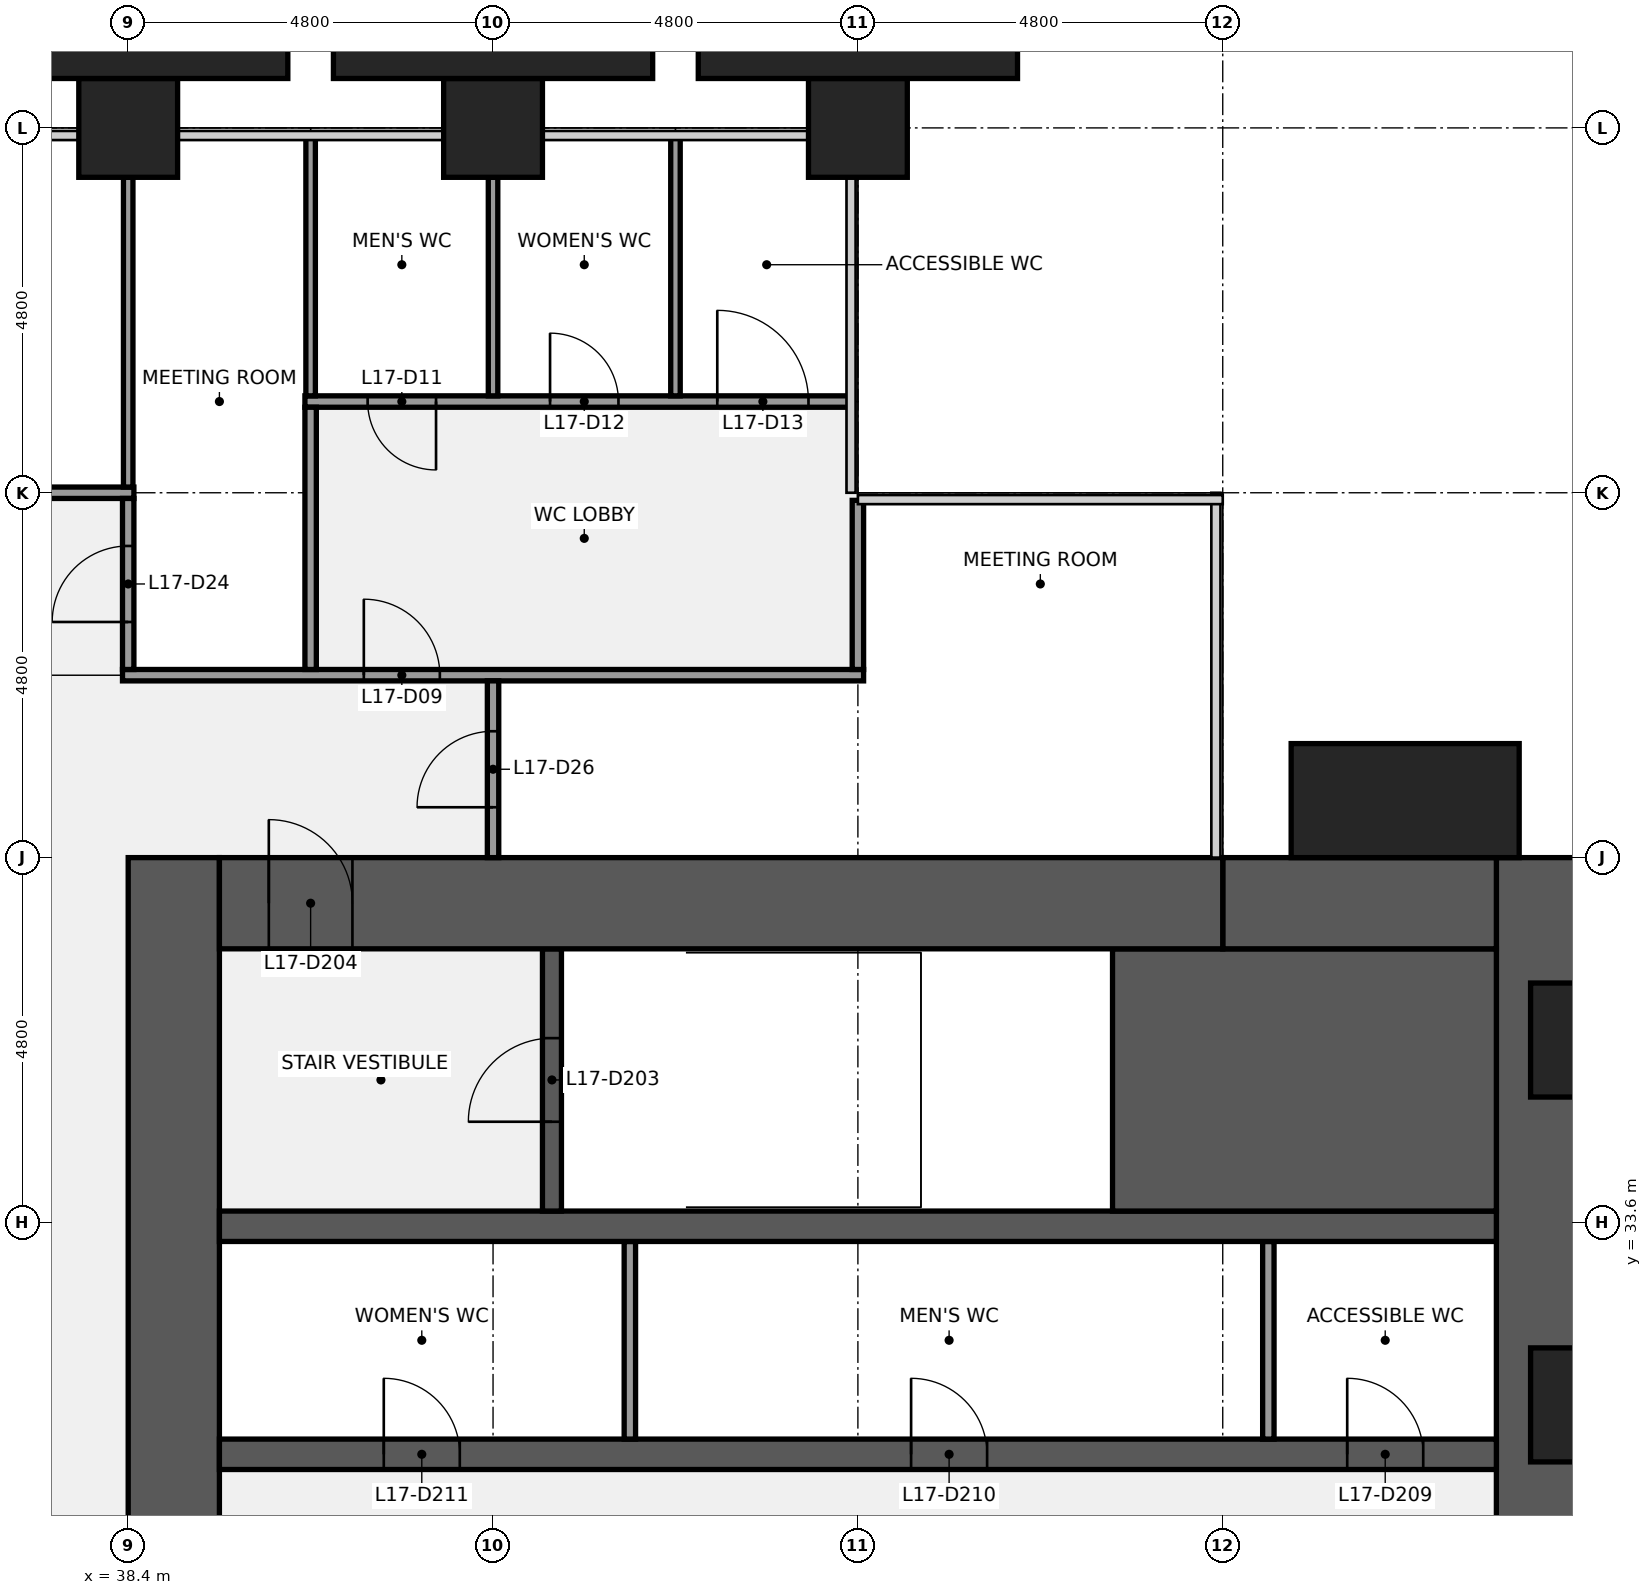
"""IFC4 building model, lengths in metres.
Left out: names, types, materials, properties, quantities, classifications, styles, units other than length and angle.
Written with IfcOpenShell. Run it as: python <this file> out.ifc"""

import sys

from ifc_helpers import new_model, si_unit, direction, frame, frame_2d, origin, origin_2d, place, context, subcontext, project, spatial, rectangle, extrude, element, fill, save


model = new_model("IFC4")
c1 = context("Model", 3, precision=1e-05, world=origin(), true_north=direction((0.0, 1.0)))
c2 = subcontext(c1, "Body", "Model", "MODEL_VIEW")
j1 = project(units=[si_unit("LENGTHUNIT", "METRE"), si_unit("PLANEANGLEUNIT", "RADIAN")], contexts=[c1])
p1 = place(None, origin())
s1 = spatial("IfcSite", under=j1, at=p1, CompositionType="ELEMENT")
p2 = place(p1, origin())
s2 = spatial("IfcBuilding", under=s1, at=p2, CompositionType="ELEMENT")
p3 = place(p2, frame((0.0, 0.0, 79.0)))
s3 = spatial("IfcBuildingStorey", under=s2, at=p3, CompositionType="ELEMENT", Elevation=79.0)
for number, where, z_axis, x_axis in (
    (1, (38.4, 48.0, 0.0), (0.0, 0.0, 1.0), (1.0, 0.0, 0.0)),
    (2, (43.2, 48.0, 0.0), (0.0, 0.0, 1.0), (1.0, 0.0, 0.0)),
    (3, (48.0, 48.0, 0.0), (0.0, 0.0, 1.0), (1.0, 0.0, 0.0)),
):
    element("IfcColumn", number, at=place(p3, frame(where, z_axis=z_axis, x_axis=x_axis)), inside=s3, PredefinedType="COLUMN", context=c2, shape_type="SweptSolid", body=[
        extrude(rectangle(XDim=1.3, YDim=1.3, at=origin_2d()), origin(), (0.0, 0.0, 1.0), 4.0),
    ])
p4 = place(p3, frame((57.0, 38.4, 0.0), z_axis=(0.0, 0.0, 1.0), x_axis=(0.0, -1.0, 0.0)))
e4 = element("IfcWall", 4, at=p4, inside=s3, PredefinedType="SHEAR", context=c2, shape_type="SweptSolid", body=[
    extrude(rectangle(XDim=28.8, YDim=1.2, at=frame_2d((14.4, 0.0))), origin(), (0.0, 0.0, 1.0), 3.84),
])
p5 = place(p4, frame((18.45, 0.0, 0.9)))
e5 = element("IfcOpeningElement", 5, at=p5, cuts=e4, PredefinedType="OPENING", context=c2, shape_type="SweptSolid", body=[
    extrude(rectangle(XDim=1.5, YDim=1.5, at=frame_2d((0.75, 0.75))), frame((0.0, 0.61, 0.0), z_axis=(0.0, -1.0, 0.0), x_axis=(1.0, 0.0, 0.0)), (0.0, 0.0, 1.0), 1.22),
])
p6 = place(p4, frame((8.85, 0.0, 0.9)))
e6 = element("IfcOpeningElement", 6, at=p6, cuts=e4, PredefinedType="OPENING", context=c2, shape_type="SweptSolid", body=[
    extrude(rectangle(XDim=1.5, YDim=1.5, at=frame_2d((0.75, 0.75))), frame((0.0, 0.61, 0.0), z_axis=(0.0, -1.0, 0.0), x_axis=(1.0, 0.0, 0.0)), (0.0, 0.0, 1.0), 1.22),
])
p7 = place(p3, frame((39.0, 9.6, 0.0), z_axis=(0.0, 0.0, 1.0), x_axis=(0.0, 1.0, 0.0)))
e7 = element("IfcWall", 7, at=p7, inside=s3, PredefinedType="SHEAR", context=c2, shape_type="SweptSolid", body=[
    extrude(rectangle(XDim=28.8, YDim=1.2, at=frame_2d((14.4, 0.0))), origin(), (0.0, 0.0, 1.0), 3.84),
])
p8 = place(p7, frame((8.7, 0.0, 0.0)))
e8 = element("IfcOpeningElement", 8, at=p8, cuts=e7, PredefinedType="OPENING", context=c2, shape_type="SweptSolid", body=[
    extrude(rectangle(XDim=1.8, YDim=2.1, at=frame_2d((0.9, 1.05))), frame((0.0, 0.61, 0.0), z_axis=(0.0, -1.0, 0.0), x_axis=(1.0, 0.0, 0.0)), (0.0, 0.0, 1.0), 1.22),
])
p9 = place(p7, frame((18.3, 0.0, 0.0)))
e9 = element("IfcOpeningElement", 9, at=p9, cuts=e7, PredefinedType="OPENING", context=c2, shape_type="SweptSolid", body=[
    extrude(rectangle(XDim=1.8, YDim=2.1, at=frame_2d((0.9, 1.05))), frame((0.0, 0.61, 0.0), z_axis=(0.0, -1.0, 0.0), x_axis=(1.0, 0.0, 0.0)), (0.0, 0.0, 1.0), 1.22),
])
p10 = place(p3, frame((39.6, 30.55, 0.0), z_axis=(0.0, 0.0, 1.0), x_axis=(1.0, 0.0, 0.0)))
e10 = element("IfcWall", 10, at=p10, inside=s3, PredefinedType="SHEAR", context=c2, shape_type="SweptSolid", body=[
    extrude(rectangle(XDim=16.8, YDim=0.4, at=frame_2d((8.4, 0.0))), origin(), (0.0, 0.0, 1.0), 3.84),
])
p11 = place(p10, frame((14.837, 0.0, 0.0)))
e11 = element("IfcOpeningElement", 11, at=p11, cuts=e10, PredefinedType="OPENING", context=c2, shape_type="SweptSolid", body=[
    extrude(rectangle(XDim=1.0, YDim=2.1, at=frame_2d((0.5, 1.05))), frame((0.0, 0.21, 0.0), z_axis=(0.0, -1.0, 0.0), x_axis=(1.0, 0.0, 0.0)), (0.0, 0.0, 1.0), 0.42),
])
p12 = place(p10, frame((9.1, 0.0, 0.0)))
e12 = element("IfcOpeningElement", 12, at=p12, cuts=e10, PredefinedType="OPENING", context=c2, shape_type="SweptSolid", body=[
    extrude(rectangle(XDim=1.0, YDim=2.1, at=frame_2d((0.5, 1.05))), frame((0.0, 0.21, 0.0), z_axis=(0.0, -1.0, 0.0), x_axis=(1.0, 0.0, 0.0)), (0.0, 0.0, 1.0), 0.42),
])
p13 = place(p10, frame((2.163, 0.0, 0.0)))
e13 = element("IfcOpeningElement", 13, at=p13, cuts=e10, PredefinedType="OPENING", context=c2, shape_type="SweptSolid", body=[
    extrude(rectangle(XDim=1.0, YDim=2.1, at=frame_2d((0.5, 1.05))), frame((0.0, 0.21, 0.0), z_axis=(0.0, -1.0, 0.0), x_axis=(1.0, 0.0, 0.0)), (0.0, 0.0, 1.0), 0.42),
])
for number, where, z_axis, x_axis in (
    (14, (53.4, 30.75, 0.0), (0.0, 0.0, 1.0), (0.0, 1.0, 0.0)),
    (15, (45.0, 30.75, 0.0), (0.0, 0.0, 1.0), (0.0, 1.0, 0.0)),
):
    element("IfcWall", number, at=place(p3, frame(where, z_axis=z_axis, x_axis=x_axis)), inside=s3, PredefinedType="PARTITIONING", context=c2, shape_type="SweptSolid", body=[
        extrude(rectangle(XDim=2.6, YDim=0.15, at=frame_2d((1.3, 0.0))), origin(), (0.0, 0.0, 1.0), 3.84),
    ])
p14 = place(p3, frame((39.6, 33.55, 0.0), z_axis=(0.0, 0.0, 1.0), x_axis=(1.0, 0.0, 0.0)))
e16 = element("IfcWall", 16, at=p14, inside=s3, PredefinedType="SHEAR", context=c2, shape_type="SweptSolid", body=[
    extrude(rectangle(XDim=16.8, YDim=0.4, at=frame_2d((8.4, 0.0))), origin(), (0.0, 0.0, 1.0), 3.84),
])
p15 = place(p3, frame((51.35, 35.475, 0.0), z_axis=(0.0, 0.0, 1.0), x_axis=(1.0, 0.0, 0.0)))
e17 = element("IfcWall", 17, at=p15, inside=s3, PredefinedType="SHEAR", context=c2, shape_type="SweptSolid", body=[
    extrude(rectangle(XDim=5.05, YDim=3.45, at=frame_2d((2.525, 0.0))), origin(), (0.0, 0.0, 1.0), 3.84),
])
p16 = place(p3, frame((43.975, 33.75, 0.0), z_axis=(0.0, 0.0, 1.0), x_axis=(0.0, 1.0, 0.0)))
e18 = element("IfcWall", 18, at=p16, inside=s3, PredefinedType="SHEAR", context=c2, shape_type="SweptSolid", body=[
    extrude(rectangle(XDim=3.45, YDim=0.25, at=frame_2d((1.725, 0.0))), origin(), (0.0, 0.0, 1.0), 3.84),
])
p17 = place(p16, frame((1.175, 0.0, 0.0)))
e19 = element("IfcOpeningElement", 19, at=p17, cuts=e18, PredefinedType="OPENING", context=c2, shape_type="SweptSolid", body=[
    extrude(rectangle(XDim=1.1, YDim=2.1, at=frame_2d((0.55, 1.05))), frame((0.0, 0.135, 0.0), z_axis=(0.0, -1.0, 0.0), x_axis=(1.0, 0.0, 0.0)), (0.0, 0.0, 1.0), 0.27),
])
p18 = place(p3, frame((52.8, 37.8, 0.0), z_axis=(0.0, 0.0, 1.0), x_axis=(1.0, 0.0, 0.0)))
e20 = element("IfcWall", 20, at=p18, inside=s3, PredefinedType="SHEAR", context=c2, shape_type="SweptSolid", body=[
    extrude(rectangle(XDim=3.6, YDim=1.2, at=frame_2d((1.8, 0.0))), origin(), (0.0, 0.0, 1.0), 3.84),
])
p19 = place(p3, frame((39.6, 37.8, 0.0), z_axis=(0.0, 0.0, 1.0), x_axis=(1.0, 0.0, 0.0)))
e21 = element("IfcWall", 21, at=p19, inside=s3, PredefinedType="SHEAR", context=c2, shape_type="SweptSolid", body=[
    extrude(rectangle(XDim=13.2, YDim=1.2, at=frame_2d((6.6, 0.0))), origin(), (0.0, 0.0, 1.0), 3.84),
])
p20 = place(p19, frame((0.65, 0.0, 0.0)))
e22 = element("IfcOpeningElement", 22, at=p20, cuts=e21, PredefinedType="OPENING", context=c2, shape_type="SweptSolid", body=[
    extrude(rectangle(XDim=1.1, YDim=2.1, at=frame_2d((0.55, 1.05))), frame((0.0, 0.61, 0.0), z_axis=(0.0, -1.0, 0.0), x_axis=(1.0, 0.0, 0.0)), (0.0, 0.0, 1.0), 1.22),
])
p21 = place(p3, frame((38.325, 40.8, 0.0), z_axis=(0.0, 0.0, 1.0), x_axis=(1.0, 0.0, 0.0)))
e23 = element("IfcWall", 23, at=p21, inside=s3, PredefinedType="PARTITIONING", context=c2, shape_type="SweptSolid", body=[
    extrude(rectangle(XDim=9.75, YDim=0.15, at=frame_2d((4.875, 0.0))), origin(), (0.0, 0.0, 1.0), 2.849),
])
p22 = place(p21, frame((3.175, 0.0, 0.0)))
e24 = element("IfcOpeningElement", 24, at=p22, cuts=e23, PredefinedType="OPENING", context=c2, shape_type="SweptSolid", body=[
    extrude(rectangle(XDim=1.0, YDim=2.1, at=frame_2d((0.5, 1.05))), frame((0.0, 0.085, 0.0), z_axis=(0.0, -1.0, 0.0), x_axis=(1.0, 0.0, 0.0)), (0.0, 0.0, 1.0), 0.17),
])
p23 = place(p3, frame((19.125, 43.2, 0.0), z_axis=(0.0, 0.0, 1.0), x_axis=(1.0, 0.0, 0.0)))
e25 = element("IfcWall", 25, at=p23, inside=s3, PredefinedType="PARTITIONING", context=c2, shape_type="SweptSolid", body=[
    extrude(rectangle(XDim=19.35, YDim=0.15, at=frame_2d((9.675, 0.0))), origin(), (0.0, 0.0, 1.0), 2.849),
])
p24 = place(p23, frame((9.175, 0.0, 0.0)))
e26 = element("IfcOpeningElement", 26, at=p24, cuts=e25, PredefinedType="OPENING", context=c2, shape_type="SweptSolid", body=[
    extrude(rectangle(XDim=1.0, YDim=2.1, at=frame_2d((0.5, 1.05))), frame((0.0, 0.085, 0.0), z_axis=(0.0, -1.0, 0.0), x_axis=(1.0, 0.0, 0.0)), (0.0, 0.0, 1.0), 0.17),
])
p25 = place(p3, frame((40.725, 44.4, 0.0), z_axis=(0.0, 0.0, 1.0), x_axis=(1.0, 0.0, 0.0)))
e27 = element("IfcWall", 27, at=p25, inside=s3, PredefinedType="PARTITIONING", context=c2, shape_type="SweptSolid", body=[
    extrude(rectangle(XDim=7.175, YDim=0.15, at=frame_2d((3.587, 0.0))), origin(), (0.0, 0.0, 1.0), 2.849),
])
p26 = place(p25, frame((0.825, 0.0, 0.0)))
e28 = element("IfcOpeningElement", 28, at=p26, cuts=e27, PredefinedType="OPENING", context=c2, shape_type="SweptSolid", body=[
    extrude(rectangle(XDim=0.9, YDim=2.1, at=frame_2d((0.45, 1.05))), frame((0.0, 0.085, 0.0), z_axis=(0.0, -1.0, 0.0), x_axis=(1.0, 0.0, 0.0)), (0.0, 0.0, 1.0), 0.17),
])
p27 = place(p25, frame((3.225, 0.0, 0.0)))
e29 = element("IfcOpeningElement", 29, at=p27, cuts=e27, PredefinedType="OPENING", context=c2, shape_type="SweptSolid", body=[
    extrude(rectangle(XDim=0.9, YDim=2.1, at=frame_2d((0.45, 1.05))), frame((0.0, 0.085, 0.0), z_axis=(0.0, -1.0, 0.0), x_axis=(1.0, 0.0, 0.0)), (0.0, 0.0, 1.0), 0.17),
])
p28 = place(p25, frame((5.425, 0.0, 0.0)))
e30 = element("IfcOpeningElement", 30, at=p28, cuts=e27, PredefinedType="OPENING", context=c2, shape_type="SweptSolid", body=[
    extrude(rectangle(XDim=1.2, YDim=2.1, at=frame_2d((0.6, 1.05))), frame((0.0, 0.085, 0.0), z_axis=(0.0, -1.0, 0.0), x_axis=(1.0, 0.0, 0.0)), (0.0, 0.0, 1.0), 0.17),
])
p29 = place(p3, frame((38.4, 43.275, 0.0), z_axis=(0.0, 0.0, 1.0), x_axis=(0.0, 1.0, 0.0)))
e31 = element("IfcWall", 31, at=p29, inside=s3, PredefinedType="PARTITIONING", context=c2, shape_type="SweptSolid", body=[
    extrude(rectangle(XDim=4.075, YDim=0.125, at=frame_2d((2.038, 0.0))), origin(), (0.0, 0.0, 1.0), 2.849),
])
p30 = place(p3, frame((38.4, 40.875, 0.0), z_axis=(0.0, 0.0, 1.0), x_axis=(0.0, 1.0, 0.0)))
e32 = element("IfcWall", 32, at=p30, inside=s3, PredefinedType="PARTITIONING", context=c2, shape_type="SweptSolid", body=[
    extrude(rectangle(XDim=2.25, YDim=0.15, at=frame_2d((1.125, 0.0))), origin(), (0.0, 0.0, 1.0), 2.849),
])
p31 = place(p30, frame((0.625, 0.0, 0.0)))
e33 = element("IfcOpeningElement", 33, at=p31, cuts=e32, PredefinedType="OPENING", context=c2, shape_type="SweptSolid", body=[
    extrude(rectangle(XDim=1.0, YDim=2.1, at=frame_2d((0.5, 1.05))), frame((0.0, 0.085, 0.0), z_axis=(0.0, -1.0, 0.0), x_axis=(1.0, 0.0, 0.0)), (0.0, 0.0, 1.0), 0.17),
])
p32 = place(p3, frame((40.8, 44.475, 0.0), z_axis=(0.0, 0.0, 1.0), x_axis=(0.0, 1.0, 0.0)))
e34 = element("IfcWall", 34, at=p32, inside=s3, PredefinedType="PARTITIONING", context=c2, shape_type="SweptSolid", body=[
    extrude(rectangle(XDim=3.425, YDim=0.125, at=frame_2d((1.712, 0.0))), origin(), (0.0, 0.0, 1.0), 2.849),
])
p33 = place(p3, frame((40.8, 40.875, 0.0), z_axis=(0.0, 0.0, 1.0), x_axis=(0.0, 1.0, 0.0)))
e35 = element("IfcWall", 35, at=p33, inside=s3, PredefinedType="PARTITIONING", context=c2, shape_type="SweptSolid", body=[
    extrude(rectangle(XDim=3.45, YDim=0.15, at=frame_2d((1.725, 0.0))), origin(), (0.0, 0.0, 1.0), 2.849),
])
p34 = place(p3, frame((43.2, 44.475, 0.0), z_axis=(0.0, 0.0, 1.0), x_axis=(0.0, 1.0, 0.0)))
e36 = element("IfcWall", 36, at=p34, inside=s3, PredefinedType="PARTITIONING", context=c2, shape_type="SweptSolid", body=[
    extrude(rectangle(XDim=2.875, YDim=0.125, at=frame_2d((1.438, 0.0))), origin(), (0.0, 0.0, 1.0), 2.849),
])
p35 = place(p3, frame((43.2, 38.4, 0.0), z_axis=(0.0, 0.0, 1.0), x_axis=(0.0, 1.0, 0.0)))
e37 = element("IfcWall", 37, at=p35, inside=s3, PredefinedType="PARTITIONING", context=c2, shape_type="SweptSolid", body=[
    extrude(rectangle(XDim=2.325, YDim=0.15, at=frame_2d((1.163, 0.0))), origin(), (0.0, 0.0, 1.0), 2.849),
])
p36 = place(p35, frame((0.663, 0.0, 0.0)))
e38 = element("IfcOpeningElement", 38, at=p36, cuts=e37, PredefinedType="OPENING", context=c2, shape_type="SweptSolid", body=[
    extrude(rectangle(XDim=1.0, YDim=2.1, at=frame_2d((0.5, 1.05))), frame((0.0, 0.085, 0.0), z_axis=(0.0, -1.0, 0.0), x_axis=(1.0, 0.0, 0.0)), (0.0, 0.0, 1.0), 0.17),
])
p37 = place(p3, frame((45.6, 44.475, 0.0), z_axis=(0.0, 0.0, 1.0), x_axis=(0.0, 1.0, 0.0)))
e39 = element("IfcWall", 39, at=p37, inside=s3, PredefinedType="PARTITIONING", context=c2, shape_type="SweptSolid", body=[
    extrude(rectangle(XDim=3.425, YDim=0.125, at=frame_2d((1.712, 0.0))), origin(), (0.0, 0.0, 1.0), 2.849),
])
p38 = place(p3, frame((48.0, 40.875, 0.0), z_axis=(0.0, 0.0, 1.0), x_axis=(0.0, 1.0, 0.0)))
e40 = element("IfcWall", 40, at=p38, inside=s3, PredefinedType="PARTITIONING", context=c2, shape_type="SweptSolid", body=[
    extrude(rectangle(XDim=2.225, YDim=0.15, at=frame_2d((1.113, 0.0))), origin(), (0.0, 0.0, 1.0), 2.849),
])
p39 = place(p3, frame((55.2, 39.15, 0.0), z_axis=(0.0, 0.0, 1.0), x_axis=(1.0, 0.0, 0.0)))
e41 = element("IfcColumn", 41, at=p39, inside=s3, PredefinedType="PILASTER", context=c2, shape_type="SweptSolid", body=[
    extrude(rectangle(XDim=3.0, YDim=1.5, at=origin_2d()), origin(), (0.0, 0.0, 1.0), 4.0),
])
for number, where, z_axis, x_axis in (
    (42, (38.4, 49.075, 0.0), (0.0, 0.0, 1.0), (1.0, 0.0, 0.0)),
    (43, (43.2, 49.075, 0.0), (0.0, 0.0, 1.0), (1.0, 0.0, 0.0)),
    (44, (48.0, 49.075, 0.0), (0.0, 0.0, 1.0), (1.0, 0.0, 0.0)),
):
    element("IfcColumn", number, at=place(p3, frame(where, z_axis=z_axis, x_axis=x_axis)), inside=s3, PredefinedType="PILASTER", context=c2, shape_type="SweptSolid", body=[
        extrude(rectangle(XDim=4.2, YDim=0.85, at=origin_2d()), origin(), (0.0, 0.0, 1.0), 4.0),
    ])
p40 = place(p17, origin())
e45 = element("IfcDoor", 45, at=p40, inside=s3, OperationType="SINGLE_SWING_LEFT", PredefinedType="DOOR", context=c2, shape_type="SweptSolid", body=[
    extrude(rectangle(XDim=1.1, YDim=2.1, at=frame_2d((0.55, 1.05))), frame((0.0, 0.025, 0.0), z_axis=(0.0, -1.0, 0.0), x_axis=(1.0, 0.0, 0.0)), (0.0, 0.0, 1.0), 0.05),
])
fill(e19, e45)
p41 = place(p20, origin())
e46 = element("IfcDoor", 46, at=p41, inside=s3, OperationType="SINGLE_SWING_LEFT", PredefinedType="DOOR", context=c2, shape_type="SweptSolid", body=[
    extrude(rectangle(XDim=1.1, YDim=2.1, at=frame_2d((0.55, 1.05))), frame((0.0, 0.025, 0.0), z_axis=(0.0, -1.0, 0.0), x_axis=(1.0, 0.0, 0.0)), (0.0, 0.0, 1.0), 0.05),
])
fill(e22, e46)
p42 = place(p11, origin())
e47 = element("IfcDoor", 47, at=p42, inside=s3, OperationType="SINGLE_SWING_LEFT", PredefinedType="DOOR", context=c2, shape_type="SweptSolid", body=[
    extrude(rectangle(XDim=1.0, YDim=2.1, at=frame_2d((0.5, 1.05))), frame((0.0, 0.025, 0.0), z_axis=(0.0, -1.0, 0.0), x_axis=(1.0, 0.0, 0.0)), (0.0, 0.0, 1.0), 0.05),
])
fill(e11, e47)
p43 = place(p12, origin())
e48 = element("IfcDoor", 48, at=p43, inside=s3, OperationType="SINGLE_SWING_LEFT", PredefinedType="DOOR", context=c2, shape_type="SweptSolid", body=[
    extrude(rectangle(XDim=1.0, YDim=2.1, at=frame_2d((0.5, 1.05))), frame((0.0, 0.025, 0.0), z_axis=(0.0, -1.0, 0.0), x_axis=(1.0, 0.0, 0.0)), (0.0, 0.0, 1.0), 0.05),
])
fill(e12, e48)
p44 = place(p13, origin())
e49 = element("IfcDoor", 49, at=p44, inside=s3, OperationType="SINGLE_SWING_LEFT", PredefinedType="DOOR", context=c2, shape_type="SweptSolid", body=[
    extrude(rectangle(XDim=1.0, YDim=2.1, at=frame_2d((0.5, 1.05))), frame((0.0, 0.025, 0.0), z_axis=(0.0, -1.0, 0.0), x_axis=(1.0, 0.0, 0.0)), (0.0, 0.0, 1.0), 0.05),
])
fill(e13, e49)
p45 = place(p22, origin())
e50 = element("IfcDoor", 50, at=p45, inside=s3, OperationType="SINGLE_SWING_LEFT", PredefinedType="DOOR", context=c2, shape_type="SweptSolid", body=[
    extrude(rectangle(XDim=1.0, YDim=2.1, at=frame_2d((0.5, 1.05))), frame((0.0, 0.025, 0.0), z_axis=(0.0, -1.0, 0.0), x_axis=(1.0, 0.0, 0.0)), (0.0, 0.0, 1.0), 0.05),
])
fill(e24, e50)
p46 = place(p26, origin())
e51 = element("IfcDoor", 51, at=p46, inside=s3, OperationType="SINGLE_SWING_RIGHT", PredefinedType="DOOR", context=c2, shape_type="SweptSolid", body=[
    extrude(rectangle(XDim=0.9, YDim=2.1, at=frame_2d((0.45, 1.05))), frame((0.0, 0.025, 0.0), z_axis=(0.0, -1.0, 0.0), x_axis=(1.0, 0.0, 0.0)), (0.0, 0.0, 1.0), 0.05),
])
fill(e28, e51)
p47 = place(p27, origin())
e52 = element("IfcDoor", 52, at=p47, inside=s3, OperationType="SINGLE_SWING_LEFT", PredefinedType="DOOR", context=c2, shape_type="SweptSolid", body=[
    extrude(rectangle(XDim=0.9, YDim=2.1, at=frame_2d((0.45, 1.05))), frame((0.0, 0.025, 0.0), z_axis=(0.0, -1.0, 0.0), x_axis=(1.0, 0.0, 0.0)), (0.0, 0.0, 1.0), 0.05),
])
fill(e29, e52)
p48 = place(p28, origin())
e53 = element("IfcDoor", 53, at=p48, inside=s3, OperationType="SINGLE_SWING_LEFT", PredefinedType="DOOR", context=c2, shape_type="SweptSolid", body=[
    extrude(rectangle(XDim=1.2, YDim=2.1, at=frame_2d((0.6, 1.05))), frame((0.0, 0.025, 0.0), z_axis=(0.0, -1.0, 0.0), x_axis=(1.0, 0.0, 0.0)), (0.0, 0.0, 1.0), 0.05),
])
fill(e30, e53)
p49 = place(p31, origin())
e54 = element("IfcDoor", 54, at=p49, inside=s3, OperationType="SINGLE_SWING_LEFT", PredefinedType="DOOR", context=c2, shape_type="SweptSolid", body=[
    extrude(rectangle(XDim=1.0, YDim=2.1, at=frame_2d((0.5, 1.05))), frame((0.0, 0.025, 0.0), z_axis=(0.0, -1.0, 0.0), x_axis=(1.0, 0.0, 0.0)), (0.0, 0.0, 1.0), 0.05),
])
fill(e33, e54)
p50 = place(p36, origin())
e55 = element("IfcDoor", 55, at=p50, inside=s3, OperationType="SINGLE_SWING_LEFT", PredefinedType="DOOR", context=c2, shape_type="SweptSolid", body=[
    extrude(rectangle(XDim=1.0, YDim=2.1, at=frame_2d((0.5, 1.05))), frame((0.0, 0.025, 0.0), z_axis=(0.0, -1.0, 0.0), x_axis=(1.0, 0.0, 0.0)), (0.0, 0.0, 1.0), 0.05),
])
fill(e38, e55)
save(model, sys.argv[1])
